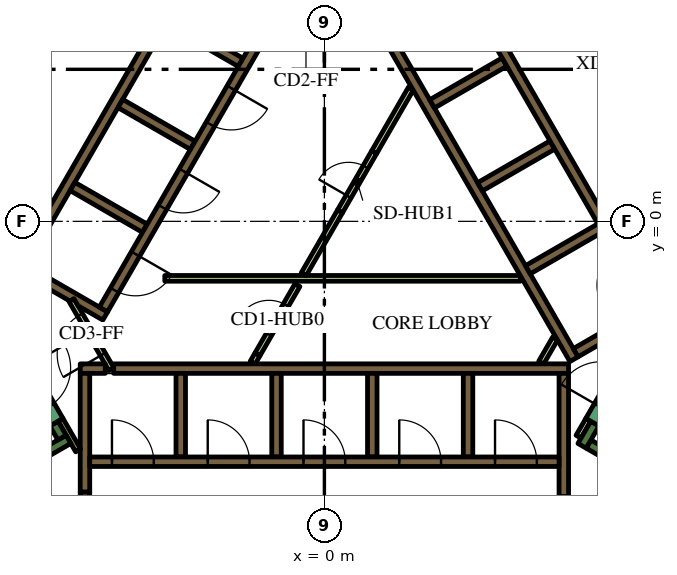
"""IFC4 building model, lengths in metres.
Left out: names, types, materials, properties, quantities, classifications, styles, units other than length and angle.
Written with IfcOpenShell. Run it as: python <this file> out.ifc"""

import sys

from ifc_helpers import new_model, si_unit, direction, frame, frame_2d, origin, place, context, subcontext, project, spatial, polyline, rectangle, outline, extrude, element, fill, save


model = new_model("IFC4")
c1 = context("Model", 3, precision=1e-05, world=origin(), true_north=direction((0.0, 1.0)))
c2 = subcontext(c1, "Body", "Model", "MODEL_VIEW")
j1 = project(units=[si_unit("LENGTHUNIT", "METRE"), si_unit("PLANEANGLEUNIT", "RADIAN")], contexts=[c1])
p1 = place(None, origin())
s1 = spatial("IfcSite", under=j1, at=p1, CompositionType="ELEMENT")
p2 = place(p1, origin())
s2 = spatial("IfcBuilding", under=s1, at=p2, CompositionType="ELEMENT")
p3 = place(p2, frame((0.0, 0.0, 166.8)))
s3 = spatial("IfcBuildingStorey", under=s2, at=p3, CompositionType="ELEMENT", Elevation=166.8)
p4 = place(p3, frame((-12.668, -1.842, 0.0), z_axis=(0.0, 0.0, 1.0), x_axis=(0.500003640647, 0.866023301845, 0.0)))
e1 = element("IfcWall", 1, at=p4, inside=s3, PredefinedType="SOLIDWALL", context=c2, shape_type="SweptSolid", body=[
    extrude(rectangle(XDim=15.858, YDim=0.8, at=frame_2d((7.929, 0.0))), origin(), (0.0, 0.0, 1.0), 4.2),
])
p5 = place(p3, frame((12.84, -9.261, 0.0), z_axis=(0.0, 0.0, 1.0), x_axis=(-0.866013990052, 0.500019768644, 0.0)))
e2 = element("IfcWall", 2, at=p5, inside=s3, PredefinedType="SOLIDWALL", context=c2, shape_type="SweptSolid", body=[
    extrude(rectangle(XDim=6.8, YDim=0.25, at=frame_2d((3.4, 0.0))), origin(), (0.0, 0.0, 1.0), 4.2),
])
p6 = place(p3, frame((6.78, -5.906, 0.0), z_axis=(0.0, 0.0, 1.0), x_axis=(0.500223362819, 0.865896406789, 0.0)))
e3 = element("IfcWall", 3, at=p6, inside=s3, PredefinedType="SOLIDWALL", context=c2, shape_type="SweptSolid", body=[
    extrude(rectangle(XDim=0.675, YDim=0.25, at=frame_2d((0.337, 0.0))), origin(), (0.0, 0.0, 1.0), 4.2),
])
p7 = place(p3, frame((-12.84, -9.261, 0.0), z_axis=(0.0, 0.0, 1.0), x_axis=(0.866016039709, 0.500016218704, 0.0)))
e4 = element("IfcWall", 4, at=p7, inside=s3, PredefinedType="SOLIDWALL", context=c2, shape_type="SweptSolid", body=[
    extrude(rectangle(XDim=7.05, YDim=0.25, at=frame_2d((3.525, 0.0))), origin(), (0.0, 0.0, 1.0), 4.2),
])
p8 = place(p3, frame((-6.905, -5.69, 0.0), z_axis=(0.0, 0.0, 1.0), x_axis=(-0.500402024738, 0.865793170242, 0.0)))
e5 = element("IfcWall", 5, at=p8, inside=s3, PredefinedType="SOLIDWALL", context=c2, shape_type="SweptSolid", body=[
    extrude(rectangle(XDim=0.425, YDim=0.25, at=frame_2d((0.212, 0.0))), origin(), (0.0, 0.0, 1.0), 4.2),
])
p9 = place(p3, frame((-5.545, -3.875, 0.0), z_axis=(0.0, 0.0, 1.0), x_axis=(1.0, 0.0, 0.0)))
e6 = element("IfcWall", 6, at=p9, inside=s3, PredefinedType="SOLIDWALL", context=c2, shape_type="SweptSolid", body=[
    extrude(rectangle(XDim=11.97, YDim=0.25, at=frame_2d((5.985, 0.0))), origin(), (0.0, 0.0, 1.0), 4.2),
])
p10 = place(p3, frame((-6.425, -3.875, 0.0), z_axis=(0.0, 0.0, 1.0), x_axis=(1.0, 0.0, 0.0)))
e7 = element("IfcWall", 7, at=p10, inside=s3, PredefinedType="SOLIDWALL", context=c2, shape_type="SweptSolid", body=[
    extrude(rectangle(XDim=0.658, YDim=0.25, at=frame_2d((0.329, 0.0))), origin(), (0.0, 0.0, 1.0), 4.2),
])
p11 = place(p3, frame((6.3, -7.24, 0.0), z_axis=(0.0, 0.0, 1.0), x_axis=(0.0, 1.0, 0.0)))
e8 = element("IfcWall", 8, at=p11, inside=s3, PredefinedType="SOLIDWALL", context=c2, shape_type="SweptSolid", body=[
    extrude(rectangle(XDim=3.24, YDim=0.25, at=frame_2d((1.62, 0.0))), origin(), (0.0, 0.0, 1.0), 4.2),
])
for number, where, z_axis, x_axis in (
    (9, (3.78, -4.0, 0.0), (0.0, 0.0, 1.0), (0.0, -1.0, 0.0)),
    (10, (1.26, -4.0, 0.0), (0.0, 0.0, 1.0), (0.0, -1.0, 0.0)),
    (11, (-1.26, -4.0, 0.0), (0.0, 0.0, 1.0), (0.0, -1.0, 0.0)),
    (12, (-3.78, -4.0, 0.0), (0.0, 0.0, 1.0), (0.0, -1.0, 0.0)),
):
    element("IfcWall", number, at=place(p3, frame(where, z_axis=z_axis, x_axis=x_axis)), inside=s3, PredefinedType="SOLIDWALL", context=c2, shape_type="SweptSolid", body=[
        extrude(rectangle(XDim=2.2, YDim=0.25, at=frame_2d((1.1, 0.0))), origin(), (0.0, 0.0, 1.0), 4.2),
    ])
p12 = place(p3, frame((-6.3, -7.125, 0.0), z_axis=(0.0, 0.0, 1.0), x_axis=(0.0, 1.0, 0.0)))
e13 = element("IfcWall", 13, at=p12, inside=s3, PredefinedType="SOLIDWALL", context=c2, shape_type="SweptSolid", body=[
    extrude(rectangle(XDim=3.125, YDim=0.25, at=frame_2d((1.562, 0.0))), origin(), (0.0, 0.0, 1.0), 4.2),
])
p13 = place(p3, frame((6.568, -3.627, 0.0), z_axis=(0.0, 0.0, 1.0), x_axis=(-0.499999455981, 0.866025717874, 0.0)))
e14 = element("IfcWall", 14, at=p13, inside=s3, PredefinedType="SOLIDWALL", context=c2, shape_type="SweptSolid", body=[
    extrude(rectangle(XDim=11.978, YDim=0.25, at=frame_2d((5.989, 0.0))), origin(), (0.0, 0.0, 1.0), 4.2),
])
for number, where, z_axis, x_axis in (
    (15, (2.834, 3.091, 0.0), (0.0, 0.0, 1.0), (0.866, 0.5, 0.0)),
    (16, (4.094, 0.909, 0.0), (0.0, 0.0, 1.0), (0.866, 0.5, 0.0)),
    (17, (5.354, -1.274, 0.0), (0.0, 0.0, 1.0), (0.866, 0.5, 0.0)),
):
    element("IfcWall", number, at=place(p3, frame(where, z_axis=z_axis, x_axis=x_axis)), inside=s3, PredefinedType="SOLIDWALL", context=c2, shape_type="SweptSolid", body=[
        extrude(rectangle(XDim=2.2, YDim=0.25, at=frame_2d((1.1, 0.0))), origin(), (0.0, 0.0, 1.0), 4.2),
    ])
p14 = place(p3, frame((6.614, -3.456, 0.0), z_axis=(0.0, 0.0, 1.0), x_axis=(0.866025089694, 0.500000544019, 0.0)))
e18 = element("IfcWall", 18, at=p14, inside=s3, PredefinedType="SOLIDWALL", context=c2, shape_type="SweptSolid", body=[
    extrude(rectangle(XDim=2.305, YDim=0.25, at=frame_2d((1.153, 0.0))), origin(), (0.0, 0.0, 1.0), 4.2),
])
p15 = place(p3, frame((-8.06, -1.311, 0.0), z_axis=(0.0, 0.0, 1.0), x_axis=(0.50000273126, 0.866023826885, 0.0)))
e19 = element("IfcWall", 19, at=p15, inside=s3, PredefinedType="SOLIDWALL", context=c2, shape_type="SweptSolid", body=[
    extrude(rectangle(XDim=10.33, YDim=0.25, at=frame_2d((5.165, 0.0))), origin(), (0.0, 0.0, 1.0), 4.2),
])
for number, where, z_axis, x_axis in (
    (20, (-2.204, 4.182, 0.0), (0.0, 0.0, 1.0), (-0.866, 0.5, 0.0)),
    (21, (-5.369, 3.1, 0.0), (0.0, 0.0, 1.0), (0.866, -0.5, 0.0)),
    (22, (-4.724, -0.182, 0.0), (0.0, 0.0, 1.0), (-0.866, 0.5, 0.0)),
):
    element("IfcWall", number, at=place(p3, frame(where, z_axis=z_axis, x_axis=x_axis)), inside=s3, PredefinedType="SOLIDWALL", context=c2, shape_type="SweptSolid", body=[
        extrude(rectangle(XDim=2.2, YDim=0.25, at=frame_2d((1.1, 0.0))), origin(), (0.0, 0.0, 1.0), 4.2),
    ])
p16 = place(p3, origin())
e23 = element("IfcWall", 23, at=p16, inside=s3, PredefinedType="SOLIDWALL", context=c2, shape_type="SweptSolid", body=[
    extrude(outline(polyline([(-5.922, -2.257), (-5.922, -2.257), (-5.705, -2.382), (-5.83, -2.598), (-6.483, -2.221), (-6.591, -2.033), (-6.591, -2.033), (-6.7, -2.096), (-7.952, -1.373), (-7.827, -1.156), (-5.922, -2.257)])), origin(), (0.0, 0.0, 1.0), 4.2),
])
p17 = place(p3, frame((-6.48, -6.027, 0.0), z_axis=(0.0, 0.0, 1.0), x_axis=(-0.499927229454, 0.866067413802, 0.0)))
e24 = element("IfcWall", 24, at=p17, inside=s3, PredefinedType="PARTITIONING", context=c2, shape_type="SweptSolid", body=[
    extrude(rectangle(XDim=0.929, YDim=0.15, at=frame_2d((0.464, 0.0))), origin(), (0.0, 0.0, 1.0), 4.2),
])
p18 = place(p3, frame((6.945, -5.222, 0.0), z_axis=(0.0, 0.0, 1.0), x_axis=(-0.499818422106, -0.866130212453, 0.0)))
e25 = element("IfcWall", 25, at=p18, inside=s3, PredefinedType="PARTITIONING", context=c2, shape_type="SweptSolid", body=[
    extrude(rectangle(XDim=0.514, YDim=0.15, at=frame_2d((0.257, 0.0))), origin(), (0.0, 0.0, 1.0), 3.15),
])
p19 = place(p3, frame((5.705, -3.718, 0.0), z_axis=(0.0, 0.0, 1.0), x_axis=(0.499962090823, 0.866047289552, 0.0)))
e26 = element("IfcWall", 26, at=p19, inside=s3, PredefinedType="PARTITIONING", context=c2, shape_type="SweptSolid", body=[
    extrude(rectangle(XDim=0.735, YDim=0.15, at=frame_2d((0.367, 0.0))), origin(), (0.0, 0.0, 1.0), 3.15),
])
p20 = place(p3, frame((-4.2, -1.5, 0.0), z_axis=(0.0, 0.0, 1.0), x_axis=(1.0, 0.0, 0.0)))
e27 = element("IfcWall", 27, at=p20, inside=s3, PredefinedType="PARTITIONING", context=c2, shape_type="SweptSolid", body=[
    extrude(rectangle(XDim=9.359, YDim=0.15, at=frame_2d((4.68, 0.0))), origin(), (0.0, 0.0, 1.0), 3.15),
])
p21 = place(p3, frame((-0.544, -1.393, 0.0), z_axis=(0.0, 0.0, 1.0), x_axis=(0.499928740635, 0.866066541489, 0.0)))
e28 = element("IfcWall", 28, at=p21, inside=s3, PredefinedType="PARTITIONING", context=c2, shape_type="SweptSolid", body=[
    extrude(rectangle(XDim=1.912, YDim=0.15, at=frame_2d((0.956, 0.0))), origin(), (0.0, 0.0, 1.0), 3.15),
])
p22 = place(p3, frame((1.312, 1.822, 0.0), z_axis=(0.0, 0.0, 1.0), x_axis=(0.500003549559, 0.866023354436, 0.0)))
e29 = element("IfcWall", 29, at=p22, inside=s3, PredefinedType="PARTITIONING", context=c2, shape_type="SweptSolid", body=[
    extrude(rectangle(XDim=1.93, YDim=0.15, at=frame_2d((0.965, 0.0))), origin(), (0.0, 0.0, 1.0), 3.15),
])
p23 = place(p3, frame((-1.887, -3.718, 0.0), z_axis=(0.0, 0.0, 1.0), x_axis=(0.500165633897, 0.865929753888, 0.0)))
e30 = element("IfcWall", 30, at=p23, inside=s3, PredefinedType="PARTITIONING", context=c2, shape_type="SweptSolid", body=[
    extrude(rectangle(XDim=0.254, YDim=0.15, at=frame_2d((0.127, 0.0))), origin(), (0.0, 0.0, 1.0), 3.15),
])
p24 = place(p3, frame((-6.175, -6.325, 0.0), z_axis=(0.0, 0.0, 1.0), x_axis=(1.0, 0.0, 0.0)))
e31 = element("IfcWall", 31, at=p24, inside=s3, PredefinedType="SOLIDWALL", context=c2, shape_type="SweptSolid", body=[
    extrude(rectangle(XDim=12.35, YDim=0.25, at=frame_2d((6.175, 0.0))), origin(), (0.0, 0.0, 1.0), 4.2),
])
p25 = place(p24, frame((0.585, 0.0, 0.0)))
e32 = element("IfcOpeningElement", 32, at=p25, cuts=e31, PredefinedType="OPENING", context=c2, shape_type="SweptSolid", body=[
    extrude(rectangle(XDim=1.1, YDim=2.1, at=frame_2d((0.55, 1.05))), frame((0.0, 0.135, 0.0), z_axis=(0.0, -1.0, 0.0), x_axis=(1.0, 0.0, 0.0)), (0.0, 0.0, 1.0), 0.27),
])
p26 = place(p24, frame((3.105, 0.0, 0.0)))
e33 = element("IfcOpeningElement", 33, at=p26, cuts=e31, PredefinedType="OPENING", context=c2, shape_type="SweptSolid", body=[
    extrude(rectangle(XDim=1.1, YDim=2.1, at=frame_2d((0.55, 1.05))), frame((0.0, 0.135, 0.0), z_axis=(0.0, -1.0, 0.0), x_axis=(1.0, 0.0, 0.0)), (0.0, 0.0, 1.0), 0.27),
])
p27 = place(p24, frame((5.625, 0.0, 0.0)))
e34 = element("IfcOpeningElement", 34, at=p27, cuts=e31, PredefinedType="OPENING", context=c2, shape_type="SweptSolid", body=[
    extrude(rectangle(XDim=1.1, YDim=2.1, at=frame_2d((0.55, 1.05))), frame((0.0, 0.135, 0.0), z_axis=(0.0, -1.0, 0.0), x_axis=(1.0, 0.0, 0.0)), (0.0, 0.0, 1.0), 0.27),
])
p28 = place(p24, frame((8.145, 0.0, 0.0)))
e35 = element("IfcOpeningElement", 35, at=p28, cuts=e31, PredefinedType="OPENING", context=c2, shape_type="SweptSolid", body=[
    extrude(rectangle(XDim=1.1, YDim=2.1, at=frame_2d((0.55, 1.05))), frame((0.0, 0.135, 0.0), z_axis=(0.0, -1.0, 0.0), x_axis=(1.0, 0.0, 0.0)), (0.0, 0.0, 1.0), 0.27),
])
p29 = place(p24, frame((10.665, 0.0, 0.0)))
e36 = element("IfcOpeningElement", 36, at=p29, cuts=e31, PredefinedType="OPENING", context=c2, shape_type="SweptSolid", body=[
    extrude(rectangle(XDim=1.1, YDim=2.1, at=frame_2d((0.55, 1.05))), frame((0.0, 0.135, 0.0), z_axis=(0.0, -1.0, 0.0), x_axis=(1.0, 0.0, 0.0)), (0.0, 0.0, 1.0), 0.27),
])
p30 = place(p3, frame((8.565, -2.185, 0.0), z_axis=(0.0, 0.0, 1.0), x_axis=(-0.499997954832, 0.866026584559, 0.0)))
e37 = element("IfcWall", 37, at=p30, inside=s3, PredefinedType="SOLIDWALL", context=c2, shape_type="SweptSolid", body=[
    extrude(rectangle(XDim=12.35, YDim=0.25, at=frame_2d((6.175, 0.0))), origin(), (0.0, 0.0, 1.0), 4.2),
])
p31 = place(p30, frame((0.585, 0.0, 0.0)))
e38 = element("IfcOpeningElement", 38, at=p31, cuts=e37, PredefinedType="OPENING", context=c2, shape_type="SweptSolid", body=[
    extrude(rectangle(XDim=1.1, YDim=2.1, at=frame_2d((0.55, 1.05))), frame((0.0, 0.135, 0.0), z_axis=(0.0, -1.0, 0.0), x_axis=(1.0, 0.0, 0.0)), (0.0, 0.0, 1.0), 0.27),
])
p32 = place(p3, frame((-0.898, 6.194, 0.0), z_axis=(0.0, 0.0, 1.0), x_axis=(-0.499996202215, -0.866027596426, 0.0)))
e39 = element("IfcWall", 39, at=p32, inside=s3, PredefinedType="SOLIDWALL", context=c2, shape_type="SweptSolid", body=[
    extrude(rectangle(XDim=9.83, YDim=0.25, at=frame_2d((4.915, 0.0))), origin(), (0.0, 0.0, 1.0), 4.2),
])
p33 = place(p32, frame((0.585, 0.0, 0.0)))
e40 = element("IfcOpeningElement", 40, at=p33, cuts=e39, PredefinedType="OPENING", context=c2, shape_type="SweptSolid", body=[
    extrude(rectangle(XDim=1.1, YDim=2.1, at=frame_2d((0.55, 1.05))), frame((0.0, 0.135, 0.0), z_axis=(0.0, -1.0, 0.0), x_axis=(1.0, 0.0, 0.0)), (0.0, 0.0, 1.0), 0.27),
])
p34 = place(p32, frame((3.105, 0.0, 0.0)))
e41 = element("IfcOpeningElement", 41, at=p34, cuts=e39, PredefinedType="OPENING", context=c2, shape_type="SweptSolid", body=[
    extrude(rectangle(XDim=1.1, YDim=2.1, at=frame_2d((0.55, 1.05))), frame((0.0, 0.135, 0.0), z_axis=(0.0, -1.0, 0.0), x_axis=(1.0, 0.0, 0.0)), (0.0, 0.0, 1.0), 0.27),
])
p35 = place(p32, frame((5.625, 0.0, 0.0)))
e42 = element("IfcOpeningElement", 42, at=p35, cuts=e39, PredefinedType="OPENING", context=c2, shape_type="SweptSolid", body=[
    extrude(rectangle(XDim=1.1, YDim=2.1, at=frame_2d((0.55, 1.05))), frame((0.0, 0.135, 0.0), z_axis=(0.0, -1.0, 0.0), x_axis=(1.0, 0.0, 0.0)), (0.0, 0.0, 1.0), 0.27),
])
p36 = place(p32, frame((8.145, 0.0, 0.0)))
e43 = element("IfcOpeningElement", 43, at=p36, cuts=e39, PredefinedType="OPENING", context=c2, shape_type="SweptSolid", body=[
    extrude(rectangle(XDim=1.1, YDim=2.1, at=frame_2d((0.55, 1.05))), frame((0.0, 0.135, 0.0), z_axis=(0.0, -1.0, 0.0), x_axis=(1.0, 0.0, 0.0)), (0.0, 0.0, 1.0), 0.27),
])
p37 = place(p3, frame((7.053, -5.284, 0.0), z_axis=(0.0, 0.0, 1.0), x_axis=(0.500078061341, 0.865980330357, 0.0)))
e44 = element("IfcWall", 44, at=p37, inside=s3, PredefinedType="SOLIDWALL", context=c2, shape_type="SweptSolid", body=[
    extrude(rectangle(XDim=2.1, YDim=0.4, at=frame_2d((1.05, 0.0))), origin(), (0.0, 0.0, 1.0), 4.2),
])
p38 = place(p37, frame((0.45, 0.0, 0.0)))
e45 = element("IfcOpeningElement", 45, at=p38, cuts=e44, PredefinedType="OPENING", context=c2, shape_type="SweptSolid", body=[
    extrude(rectangle(XDim=1.2, YDim=2.1, at=frame_2d((0.6, 1.05))), frame((0.0, 0.21, 0.0), z_axis=(0.0, -1.0, 0.0), x_axis=(1.0, 0.0, 0.0)), (0.0, 0.0, 1.0), 0.42),
])
p39 = place(p3, frame((-8.103, -3.466, 0.0), z_axis=(0.0, 0.0, 1.0), x_axis=(0.500078061341, -0.865980330357, 0.0)))
e46 = element("IfcWall", 46, at=p39, inside=s3, PredefinedType="SOLIDWALL", context=c2, shape_type="SweptSolid", body=[
    extrude(rectangle(XDim=2.1, YDim=0.4, at=frame_2d((1.05, 0.0))), origin(), (0.0, 0.0, 1.0), 4.2),
])
p40 = place(p39, frame((0.45, 0.0, 0.0)))
e47 = element("IfcOpeningElement", 47, at=p40, cuts=e46, PredefinedType="OPENING", context=c2, shape_type="SweptSolid", body=[
    extrude(rectangle(XDim=1.2, YDim=2.1, at=frame_2d((0.6, 1.05))), frame((0.0, 0.21, 0.0), z_axis=(0.0, -1.0, 0.0), x_axis=(1.0, 0.0, 0.0)), (0.0, 0.0, 1.0), 0.42),
])
p41 = place(p3, frame((-6.3, -7.125, 0.0), z_axis=(0.0, 0.0, 1.0), x_axis=(0.0, -1.0, 0.0)))
e48 = element("IfcWall", 48, at=p41, inside=s3, PredefinedType="SOLIDWALL", context=c2, shape_type="SweptSolid", body=[
    extrude(rectangle(XDim=1.8, YDim=0.25, at=frame_2d((0.9, 0.0))), origin(), (0.0, 0.0, 1.0), 4.2),
])
p42 = place(p41, frame((0.45, 0.0, 0.0)))
e49 = element("IfcOpeningElement", 49, at=p42, cuts=e48, PredefinedType="OPENING", context=c2, shape_type="SweptSolid", body=[
    extrude(rectangle(XDim=0.9, YDim=2.1, at=frame_2d((0.45, 1.05))), frame((0.0, 0.135, 0.0), z_axis=(0.0, -1.0, 0.0), x_axis=(1.0, 0.0, 0.0)), (0.0, 0.0, 1.0), 0.27),
])
p43 = place(p3, frame((-1.76, -3.498, 0.0), z_axis=(0.0, 0.0, 1.0), x_axis=(0.499977374825, 0.866038466041, 0.0)))
e50 = element("IfcWall", 50, at=p43, inside=s3, PredefinedType="PARTITIONING", context=c2, shape_type="SweptSolid", body=[
    extrude(rectangle(XDim=2.1, YDim=0.15, at=frame_2d((1.05, 0.0))), origin(), (0.0, 0.0, 1.0), 3.15),
])
p44 = place(p43, frame((0.6, 0.0, 0.0)))
e51 = element("IfcOpeningElement", 51, at=p44, cuts=e50, PredefinedType="OPENING", context=c2, shape_type="SweptSolid", body=[
    extrude(rectangle(XDim=0.9, YDim=2.1, at=frame_2d((0.45, 1.05))), frame((0.0, 0.085, 0.0), z_axis=(0.0, -1.0, 0.0), x_axis=(1.0, 0.0, 0.0)), (0.0, 0.0, 1.0), 0.17),
])
p45 = place(p3, frame((-5.606, -3.89, 0.0), z_axis=(0.0, 0.0, 1.0), x_axis=(-0.500027713859, 0.866009402589, 0.0)))
e52 = element("IfcWall", 52, at=p45, inside=s3, PredefinedType="PARTITIONING", context=c2, shape_type="SweptSolid", body=[
    extrude(rectangle(XDim=2.1, YDim=0.15, at=frame_2d((1.05, 0.0))), origin(), (0.0, 0.0, 1.0), 3.15),
])
p46 = place(p45, frame((0.45, 0.0, 0.0)))
e53 = element("IfcOpeningElement", 53, at=p46, cuts=e52, PredefinedType="OPENING", context=c2, shape_type="SweptSolid", body=[
    extrude(rectangle(XDim=1.2, YDim=2.1, at=frame_2d((0.6, 1.05))), frame((0.0, 0.085, 0.0), z_axis=(0.0, -1.0, 0.0), x_axis=(1.0, 0.0, 0.0)), (0.0, 0.0, 1.0), 0.17),
])
p47 = place(p3, frame((0.412, 0.263, 0.0), z_axis=(0.0, 0.0, 1.0), x_axis=(0.500062916607, 0.865989075817, 0.0)))
e54 = element("IfcWall", 54, at=p47, inside=s3, PredefinedType="PARTITIONING", context=c2, shape_type="SweptSolid", body=[
    extrude(rectangle(XDim=1.8, YDim=0.15, at=frame_2d((0.9, 0.0))), origin(), (0.0, 0.0, 1.0), 3.15),
])
p48 = place(p47, frame((0.45, 0.0, 0.0)))
e55 = element("IfcOpeningElement", 55, at=p48, cuts=e54, PredefinedType="OPENING", context=c2, shape_type="SweptSolid", body=[
    extrude(rectangle(XDim=0.9, YDim=2.1, at=frame_2d((0.45, 1.05))), frame((0.0, 0.085, 0.0), z_axis=(0.0, -1.0, 0.0), x_axis=(1.0, 0.0, 0.0)), (0.0, 0.0, 1.0), 0.17),
])
p49 = place(p25, origin())
e56 = element("IfcDoor", 56, at=p49, inside=s3, OperationType="DOUBLE_DOOR_SLIDING", PredefinedType="DOOR", context=c2, shape_type="SweptSolid", body=[
    extrude(rectangle(XDim=1.1, YDim=2.1, at=frame_2d((0.55, 1.05))), frame((0.0, 0.025, 0.0), z_axis=(0.0, -1.0, 0.0), x_axis=(1.0, 0.0, 0.0)), (0.0, 0.0, 1.0), 0.05),
])
fill(e32, e56)
p50 = place(p26, origin())
e57 = element("IfcDoor", 57, at=p50, inside=s3, OperationType="DOUBLE_DOOR_SLIDING", PredefinedType="DOOR", context=c2, shape_type="SweptSolid", body=[
    extrude(rectangle(XDim=1.1, YDim=2.1, at=frame_2d((0.55, 1.05))), frame((0.0, 0.025, 0.0), z_axis=(0.0, -1.0, 0.0), x_axis=(1.0, 0.0, 0.0)), (0.0, 0.0, 1.0), 0.05),
])
fill(e33, e57)
p51 = place(p27, origin())
e58 = element("IfcDoor", 58, at=p51, inside=s3, OperationType="DOUBLE_DOOR_SLIDING", PredefinedType="DOOR", context=c2, shape_type="SweptSolid", body=[
    extrude(rectangle(XDim=1.1, YDim=2.1, at=frame_2d((0.55, 1.05))), frame((0.0, 0.025, 0.0), z_axis=(0.0, -1.0, 0.0), x_axis=(1.0, 0.0, 0.0)), (0.0, 0.0, 1.0), 0.05),
])
fill(e34, e58)
p52 = place(p28, origin())
e59 = element("IfcDoor", 59, at=p52, inside=s3, OperationType="DOUBLE_DOOR_SLIDING", PredefinedType="DOOR", context=c2, shape_type="SweptSolid", body=[
    extrude(rectangle(XDim=1.1, YDim=2.1, at=frame_2d((0.55, 1.05))), frame((0.0, 0.025, 0.0), z_axis=(0.0, -1.0, 0.0), x_axis=(1.0, 0.0, 0.0)), (0.0, 0.0, 1.0), 0.05),
])
fill(e35, e59)
p53 = place(p29, origin())
e60 = element("IfcDoor", 60, at=p53, inside=s3, OperationType="DOUBLE_DOOR_SLIDING", PredefinedType="DOOR", context=c2, shape_type="SweptSolid", body=[
    extrude(rectangle(XDim=1.1, YDim=2.1, at=frame_2d((0.55, 1.05))), frame((0.0, 0.025, 0.0), z_axis=(0.0, -1.0, 0.0), x_axis=(1.0, 0.0, 0.0)), (0.0, 0.0, 1.0), 0.05),
])
fill(e36, e60)
p54 = place(p34, origin())
e61 = element("IfcDoor", 61, at=p54, inside=s3, OperationType="DOUBLE_DOOR_SLIDING", PredefinedType="DOOR", context=c2, shape_type="SweptSolid", body=[
    extrude(rectangle(XDim=1.1, YDim=2.1, at=frame_2d((0.55, 1.05))), frame((0.0, 0.025, 0.0), z_axis=(0.0, -1.0, 0.0), x_axis=(1.0, 0.0, 0.0)), (0.0, 0.0, 1.0), 0.05),
])
fill(e41, e61)
p55 = place(p35, origin())
e62 = element("IfcDoor", 62, at=p55, inside=s3, OperationType="DOUBLE_DOOR_SLIDING", PredefinedType="DOOR", context=c2, shape_type="SweptSolid", body=[
    extrude(rectangle(XDim=1.1, YDim=2.1, at=frame_2d((0.55, 1.05))), frame((0.0, 0.025, 0.0), z_axis=(0.0, -1.0, 0.0), x_axis=(1.0, 0.0, 0.0)), (0.0, 0.0, 1.0), 0.05),
])
fill(e42, e62)
p56 = place(p36, origin())
e63 = element("IfcDoor", 63, at=p56, inside=s3, OperationType="DOUBLE_DOOR_SLIDING", PredefinedType="DOOR", context=c2, shape_type="SweptSolid", body=[
    extrude(rectangle(XDim=1.1, YDim=2.1, at=frame_2d((0.55, 1.05))), frame((0.0, 0.025, 0.0), z_axis=(0.0, -1.0, 0.0), x_axis=(1.0, 0.0, 0.0)), (0.0, 0.0, 1.0), 0.05),
])
fill(e43, e63)
p57 = place(p44, origin())
e64 = element("IfcDoor", 64, at=p57, inside=s3, OperationType="SINGLE_SWING_LEFT", PredefinedType="DOOR", context=c2, shape_type="SweptSolid", body=[
    extrude(rectangle(XDim=0.9, YDim=2.1, at=frame_2d((0.45, 1.05))), frame((0.0, 0.025, 0.0), z_axis=(0.0, -1.0, 0.0), x_axis=(1.0, 0.0, 0.0)), (0.0, 0.0, 1.0), 0.05),
])
fill(e51, e64)
p58 = place(p46, origin())
e65 = element("IfcDoor", 65, at=p58, inside=s3, OperationType="SINGLE_SWING_LEFT", PredefinedType="DOOR", context=c2, shape_type="SweptSolid", body=[
    extrude(rectangle(XDim=1.2, YDim=2.1, at=frame_2d((0.6, 1.05))), frame((0.0, 0.025, 0.0), z_axis=(0.0, -1.0, 0.0), x_axis=(1.0, 0.0, 0.0)), (0.0, 0.0, 1.0), 0.05),
])
fill(e53, e65)
p59 = place(p48, origin())
e66 = element("IfcDoor", 66, at=p59, inside=s3, OperationType="SINGLE_SWING_LEFT", PredefinedType="DOOR", context=c2, shape_type="SweptSolid", body=[
    extrude(rectangle(XDim=0.9, YDim=2.1, at=frame_2d((0.45, 1.05))), frame((0.0, 0.025, 0.0), z_axis=(0.0, -1.0, 0.0), x_axis=(1.0, 0.0, 0.0)), (0.0, 0.0, 1.0), 0.05),
])
fill(e55, e66)
save(model, sys.argv[1])
